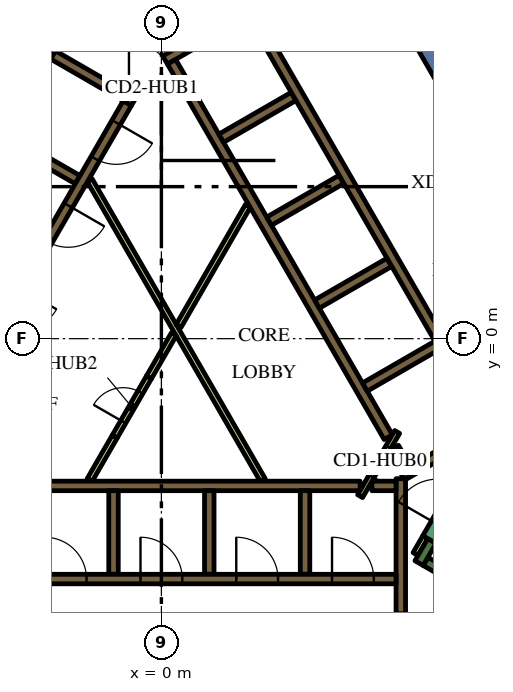
"""IFC4 building model, lengths in metres.
Left out: names, types, materials, properties, quantities, classifications, styles, units other than length and angle.
Written with IfcOpenShell. Run it as: python <this file> out.ifc"""

import sys

from ifc_helpers import new_model, si_unit, direction, frame, frame_2d, origin, place, context, subcontext, project, spatial, polyline, rectangle, outline, extrude, element, fill, save


model = new_model("IFC4")
c1 = context("Model", 3, precision=1e-05, world=origin(), true_north=direction((0.0, 1.0)))
c2 = subcontext(c1, "Body", "Model", "MODEL_VIEW")
j1 = project(units=[si_unit("LENGTHUNIT", "METRE"), si_unit("PLANEANGLEUNIT", "RADIAN")], contexts=[c1])
p1 = place(None, origin())
s1 = spatial("IfcSite", under=j1, at=p1, CompositionType="ELEMENT")
p2 = place(p1, origin())
s2 = spatial("IfcBuilding", under=s1, at=p2, CompositionType="ELEMENT")
p3 = place(p2, frame((0.0, 0.0, 201.6)))
s3 = spatial("IfcBuildingStorey", under=s2, at=p3, CompositionType="ELEMENT", Elevation=201.6)
p4 = place(p3, frame((8.235, 5.736, 0.0), z_axis=(0.0, 0.0, 1.0), x_axis=(-0.499983401189, 0.8660349869, 0.0)))
e1 = element("IfcWall", 1, at=p4, inside=s3, PredefinedType="SOLIDWALL", context=c2, shape_type="SweptSolid", body=[
    extrude(rectangle(XDim=12.472, YDim=0.7, at=frame_2d((6.236, 0.0))), origin(), (0.0, 0.0, 1.0), 4.2),
])
p5 = place(p3, frame((12.84, -9.261, 0.0), z_axis=(0.0, 0.0, 1.0), x_axis=(-0.866013990052, 0.500019768644, 0.0)))
e2 = element("IfcWall", 2, at=p5, inside=s3, PredefinedType="SOLIDWALL", context=c2, shape_type="SweptSolid", body=[
    extrude(rectangle(XDim=6.8, YDim=0.25, at=frame_2d((3.4, 0.0))), origin(), (0.0, 0.0, 1.0), 4.2),
])
p6 = place(p3, frame((6.78, -5.906, 0.0), z_axis=(0.0, 0.0, 1.0), x_axis=(0.500223362819, 0.865896406789, 0.0)))
e3 = element("IfcWall", 3, at=p6, inside=s3, PredefinedType="SOLIDWALL", context=c2, shape_type="SweptSolid", body=[
    extrude(rectangle(XDim=0.675, YDim=0.25, at=frame_2d((0.337, 0.0))), origin(), (0.0, 0.0, 1.0), 4.2),
])
p7 = place(p3, frame((-5.259, -3.875, 0.0), z_axis=(0.0, 0.0, 1.0), x_axis=(1.0, 0.0, 0.0)))
e4 = element("IfcWall", 4, at=p7, inside=s3, PredefinedType="SOLIDWALL", context=c2, shape_type="SweptSolid", body=[
    extrude(rectangle(XDim=10.489, YDim=0.25, at=frame_2d((5.244, 0.0))), origin(), (0.0, 0.0, 1.0), 4.2),
])
for number, where, z_axis, x_axis in (
    (5, (3.78, -4.0, 0.0), (0.0, 0.0, 1.0), (0.0, -1.0, 0.0)),
    (6, (1.26, -4.0, 0.0), (0.0, 0.0, 1.0), (0.0, -1.0, 0.0)),
    (7, (-1.26, -4.0, 0.0), (0.0, 0.0, 1.0), (0.0, -1.0, 0.0)),
):
    element("IfcWall", number, at=place(p3, frame(where, z_axis=z_axis, x_axis=x_axis)), inside=s3, PredefinedType="SOLIDWALL", context=c2, shape_type="SweptSolid", body=[
        extrude(rectangle(XDim=2.2, YDim=0.25, at=frame_2d((1.1, 0.0))), origin(), (0.0, 0.0, 1.0), 4.2),
    ])
p8 = place(p3, frame((6.3, -7.24, 0.0), z_axis=(0.0, 0.0, 1.0), x_axis=(0.0, 1.0, 0.0)))
e8 = element("IfcWall", 8, at=p8, inside=s3, PredefinedType="SOLIDWALL", context=c2, shape_type="SweptSolid", body=[
    extrude(rectangle(XDim=3.556, YDim=0.25, at=frame_2d((1.778, 0.0))), origin(), (0.0, 0.0, 1.0), 4.2),
])
p9 = place(p3, frame((5.538, -3.875, 0.0), z_axis=(0.0, 0.0, 1.0), x_axis=(1.0, 0.0, 0.0)))
e9 = element("IfcWall", 9, at=p9, inside=s3, PredefinedType="SOLIDWALL", context=c2, shape_type="SweptSolid", body=[
    extrude(rectangle(XDim=0.637, YDim=0.25, at=frame_2d((0.318, 0.0))), origin(), (0.0, 0.0, 1.0), 4.2),
])
p10 = place(p3, frame((9.19, -1.969, 0.0), z_axis=(0.0, 0.0, 1.0), x_axis=(-0.866057109641, -0.499945079824, 0.0)))
e10 = element("IfcWall", 10, at=p10, inside=s3, PredefinedType="SOLIDWALL", context=c2, shape_type="SweptSolid", body=[
    extrude(rectangle(XDim=3.291, YDim=0.25, at=frame_2d((1.646, 0.0))), origin(), (0.0, 0.0, 1.0), 4.2),
])
p11 = place(p3, frame((6.13, -2.867, 0.0), z_axis=(0.0, 0.0, 1.0), x_axis=(0.500160776593, -0.865932559475, 0.0)))
e11 = element("IfcWall", 11, at=p11, inside=s3, PredefinedType="SOLIDWALL", context=c2, shape_type="SweptSolid", body=[
    extrude(rectangle(XDim=0.627, YDim=0.25, at=frame_2d((0.313, 0.0))), origin(), (0.0, 0.0, 1.0), 4.2),
])
p12 = place(p3, frame((3.1, 9.064, 0.0), z_axis=(0.0, 0.0, 1.0), x_axis=(-0.866033137035, -0.499986605379, 0.0)))
e12 = element("IfcWall", 12, at=p12, inside=s3, PredefinedType="SOLIDWALL", context=c2, shape_type="SweptSolid", body=[
    extrude(rectangle(XDim=3.467, YDim=0.25, at=frame_2d((1.733, 0.0))), origin(), (0.0, 0.0, 1.0), 4.2),
])
p13 = place(p3, frame((0.268, 7.285, 0.0), z_axis=(0.0, 0.0, 1.0), x_axis=(0.500098681536, -0.865968422476, 0.0)))
e13 = element("IfcWall", 13, at=p13, inside=s3, PredefinedType="SOLIDWALL", context=c2, shape_type="SweptSolid", body=[
    extrude(rectangle(XDim=0.636, YDim=0.25, at=frame_2d((0.318, 0.0))), origin(), (0.0, 0.0, 1.0), 4.2),
])
p14 = place(p3, frame((5.97, -2.591, 0.0), z_axis=(0.0, 0.0, 1.0), x_axis=(-0.499994469932, 0.866028596547, 0.0)))
e14 = element("IfcWall", 14, at=p14, inside=s3, PredefinedType="SOLIDWALL", context=c2, shape_type="SweptSolid", body=[
    extrude(rectangle(XDim=10.488, YDim=0.25, at=frame_2d((5.244, 0.0))), origin(), (0.0, 0.0, 1.0), 4.2),
])
p15 = place(p3, frame((1.574, 5.274, 0.0), z_axis=(0.0, 0.0, 1.0), x_axis=(0.866028486751, 0.499994660107, 0.0)))
e15 = element("IfcWall", 15, at=p15, inside=s3, PredefinedType="SOLIDWALL", context=c2, shape_type="SweptSolid", body=[
    extrude(rectangle(XDim=2.2, YDim=0.25, at=frame_2d((1.1, 0.0))), origin(), (0.0, 0.0, 1.0), 4.2),
])
for number, where, z_axis, x_axis in (
    (16, (2.834, 3.091, 0.0), (0.0, 0.0, 1.0), (0.866, 0.5, 0.0)),
    (17, (4.094, 0.909, 0.0), (0.0, 0.0, 1.0), (0.866, 0.5, 0.0)),
    (18, (5.354, -1.274, 0.0), (0.0, 0.0, 1.0), (0.866, 0.5, 0.0)),
):
    element("IfcWall", number, at=place(p3, frame(where, z_axis=z_axis, x_axis=x_axis)), inside=s3, PredefinedType="SOLIDWALL", context=c2, shape_type="SweptSolid", body=[
        extrude(rectangle(XDim=2.2, YDim=0.25, at=frame_2d((1.1, 0.0))), origin(), (0.0, 0.0, 1.0), 4.2),
    ])
p16 = place(p3, origin())
e19 = element("IfcWall", 19, at=p16, inside=s3, PredefinedType="SOLIDWALL", context=c2, shape_type="SweptSolid", body=[
    extrude(outline(polyline([(-2.912, 7.356), (-2.787, 7.573), (-1.232, 6.675), (-1.303, 6.675), (-1.304, 6.675), (-1.304, 6.675), (-1.304, 6.525), (-1.304, 6.525), (-1.303, 6.525), (-0.971, 6.525), (-0.665, 6.348), (-0.79, 6.132), (-1.007, 6.257), (-1.007, 6.257), (-2.912, 7.356)])), origin(), (0.0, 0.0, 1.0), 4.2),
])
p17 = place(p3, frame((-2.204, 4.182, 0.0), z_axis=(0.0, 0.0, 1.0), x_axis=(-0.866008176907, 0.50002983664, 0.0)))
e20 = element("IfcWall", 20, at=p17, inside=s3, PredefinedType="SOLIDWALL", context=c2, shape_type="SweptSolid", body=[
    extrude(rectangle(XDim=2.2, YDim=0.25, at=frame_2d((1.1, 0.0))), origin(), (0.0, 0.0, 1.0), 4.2),
])
p18 = place(p3, frame((6.945, -5.222, 0.0), z_axis=(0.0, 0.0, 1.0), x_axis=(-0.499818422106, -0.866130212453, 0.0)))
e21 = element("IfcWall", 21, at=p18, inside=s3, PredefinedType="PARTITIONING", context=c2, shape_type="SweptSolid", body=[
    extrude(rectangle(XDim=0.514, YDim=0.15, at=frame_2d((0.257, 0.0))), origin(), (0.0, 0.0, 1.0), 3.45),
])
p19 = place(p3, frame((-1.887, 4.168, 0.0), z_axis=(0.0, 0.0, 1.0), x_axis=(0.499997069472, -0.866027095719, 0.0)))
e22 = element("IfcWall", 22, at=p19, inside=s3, PredefinedType="PARTITIONING", context=c2, shape_type="SweptSolid", body=[
    extrude(rectangle(XDim=9.106, YDim=0.15, at=frame_2d((4.553, 0.0))), origin(), (0.0, 0.0, 1.0), 3.45),
])
p20 = place(p3, frame((-0.329, -1.021, 0.0), z_axis=(0.0, 0.0, 1.0), x_axis=(0.500033191285, 0.866006239939, 0.0)))
e23 = element("IfcWall", 23, at=p20, inside=s3, PredefinedType="PARTITIONING", context=c2, shape_type="SweptSolid", body=[
    extrude(rectangle(XDim=1.315, YDim=0.15, at=frame_2d((0.657, 0.0))), origin(), (0.0, 0.0, 1.0), 3.45),
])
p21 = place(p3, frame((2.277, 3.493, 0.0), z_axis=(0.0, 0.0, 1.0), x_axis=(-0.499994550825, -0.866028549844, 0.0)))
e24 = element("IfcWall", 24, at=p21, inside=s3, PredefinedType="PARTITIONING", context=c2, shape_type="SweptSolid", body=[
    extrude(rectangle(XDim=3.65, YDim=0.15, at=frame_2d((1.825, 0.0))), origin(), (0.0, 0.0, 1.0), 3.45),
])
p22 = place(p3, frame((-1.887, -3.718, 0.0), z_axis=(0.0, 0.0, 1.0), x_axis=(0.500033191285, 0.866006239939, 0.0)))
e25 = element("IfcWall", 25, at=p22, inside=s3, PredefinedType="PARTITIONING", context=c2, shape_type="SweptSolid", body=[
    extrude(rectangle(XDim=1.315, YDim=0.15, at=frame_2d((0.657, 0.0))), origin(), (0.0, 0.0, 1.0), 3.45),
])
p23 = place(p3, frame((-6.175, -6.325, 0.0), z_axis=(0.0, 0.0, 1.0), x_axis=(1.0, 0.0, 0.0)))
e26 = element("IfcWall", 26, at=p23, inside=s3, PredefinedType="SOLIDWALL", context=c2, shape_type="SweptSolid", body=[
    extrude(rectangle(XDim=12.35, YDim=0.25, at=frame_2d((6.175, 0.0))), origin(), (0.0, 0.0, 1.0), 4.2),
])
p24 = place(p23, frame((0.585, 0.0, 0.0)))
e27 = element("IfcOpeningElement", 27, at=p24, cuts=e26, PredefinedType="OPENING", context=c2, shape_type="SweptSolid", body=[
    extrude(rectangle(XDim=1.1, YDim=2.1, at=frame_2d((0.55, 1.05))), frame((0.0, 0.135, 0.0), z_axis=(0.0, -1.0, 0.0), x_axis=(1.0, 0.0, 0.0)), (0.0, 0.0, 1.0), 0.27),
])
p25 = place(p23, frame((3.105, 0.0, 0.0)))
e28 = element("IfcOpeningElement", 28, at=p25, cuts=e26, PredefinedType="OPENING", context=c2, shape_type="SweptSolid", body=[
    extrude(rectangle(XDim=1.1, YDim=2.1, at=frame_2d((0.55, 1.05))), frame((0.0, 0.135, 0.0), z_axis=(0.0, -1.0, 0.0), x_axis=(1.0, 0.0, 0.0)), (0.0, 0.0, 1.0), 0.27),
])
p26 = place(p23, frame((5.625, 0.0, 0.0)))
e29 = element("IfcOpeningElement", 29, at=p26, cuts=e26, PredefinedType="OPENING", context=c2, shape_type="SweptSolid", body=[
    extrude(rectangle(XDim=1.1, YDim=2.1, at=frame_2d((0.55, 1.05))), frame((0.0, 0.135, 0.0), z_axis=(0.0, -1.0, 0.0), x_axis=(1.0, 0.0, 0.0)), (0.0, 0.0, 1.0), 0.27),
])
p27 = place(p23, frame((8.145, 0.0, 0.0)))
e30 = element("IfcOpeningElement", 30, at=p27, cuts=e26, PredefinedType="OPENING", context=c2, shape_type="SweptSolid", body=[
    extrude(rectangle(XDim=1.1, YDim=2.1, at=frame_2d((0.55, 1.05))), frame((0.0, 0.135, 0.0), z_axis=(0.0, -1.0, 0.0), x_axis=(1.0, 0.0, 0.0)), (0.0, 0.0, 1.0), 0.27),
])
p28 = place(p23, frame((10.665, 0.0, 0.0)))
e31 = element("IfcOpeningElement", 31, at=p28, cuts=e26, PredefinedType="OPENING", context=c2, shape_type="SweptSolid", body=[
    extrude(rectangle(XDim=1.1, YDim=2.1, at=frame_2d((0.55, 1.05))), frame((0.0, 0.135, 0.0), z_axis=(0.0, -1.0, 0.0), x_axis=(1.0, 0.0, 0.0)), (0.0, 0.0, 1.0), 0.27),
])
p29 = place(p3, frame((8.565, -2.185, 0.0), z_axis=(0.0, 0.0, 1.0), x_axis=(-0.499997954832, 0.866026584559, 0.0)))
e32 = element("IfcWall", 32, at=p29, inside=s3, PredefinedType="SOLIDWALL", context=c2, shape_type="SweptSolid", body=[
    extrude(rectangle(XDim=12.35, YDim=0.25, at=frame_2d((6.175, 0.0))), origin(), (0.0, 0.0, 1.0), 4.2),
])
p30 = place(p29, frame((0.585, 0.0, 0.0)))
e33 = element("IfcOpeningElement", 33, at=p30, cuts=e32, PredefinedType="OPENING", context=c2, shape_type="SweptSolid", body=[
    extrude(rectangle(XDim=1.1, YDim=2.1, at=frame_2d((0.55, 1.05))), frame((0.0, 0.135, 0.0), z_axis=(0.0, -1.0, 0.0), x_axis=(1.0, 0.0, 0.0)), (0.0, 0.0, 1.0), 0.27),
])
p31 = place(p3, frame((-0.898, 6.194, 0.0), z_axis=(0.0, 0.0, 1.0), x_axis=(-0.499996202215, -0.866027596426, 0.0)))
e34 = element("IfcWall", 34, at=p31, inside=s3, PredefinedType="SOLIDWALL", context=c2, shape_type="SweptSolid", body=[
    extrude(rectangle(XDim=9.83, YDim=0.25, at=frame_2d((4.915, 0.0))), origin(), (0.0, 0.0, 1.0), 4.2),
])
p32 = place(p31, frame((0.585, 0.0, 0.0)))
e35 = element("IfcOpeningElement", 35, at=p32, cuts=e34, PredefinedType="OPENING", context=c2, shape_type="SweptSolid", body=[
    extrude(rectangle(XDim=1.1, YDim=2.1, at=frame_2d((0.55, 1.05))), frame((0.0, 0.135, 0.0), z_axis=(0.0, -1.0, 0.0), x_axis=(1.0, 0.0, 0.0)), (0.0, 0.0, 1.0), 0.27),
])
p33 = place(p31, frame((3.105, 0.0, 0.0)))
e36 = element("IfcOpeningElement", 36, at=p33, cuts=e34, PredefinedType="OPENING", context=c2, shape_type="SweptSolid", body=[
    extrude(rectangle(XDim=1.1, YDim=2.1, at=frame_2d((0.55, 1.05))), frame((0.0, 0.135, 0.0), z_axis=(0.0, -1.0, 0.0), x_axis=(1.0, 0.0, 0.0)), (0.0, 0.0, 1.0), 0.27),
])
p34 = place(p31, frame((5.625, 0.0, 0.0)))
e37 = element("IfcOpeningElement", 37, at=p34, cuts=e34, PredefinedType="OPENING", context=c2, shape_type="SweptSolid", body=[
    extrude(rectangle(XDim=1.1, YDim=2.1, at=frame_2d((0.55, 1.05))), frame((0.0, 0.135, 0.0), z_axis=(0.0, -1.0, 0.0), x_axis=(1.0, 0.0, 0.0)), (0.0, 0.0, 1.0), 0.27),
])
p35 = place(p31, frame((8.145, 0.0, 0.0)))
e38 = element("IfcOpeningElement", 38, at=p35, cuts=e34, PredefinedType="OPENING", context=c2, shape_type="SweptSolid", body=[
    extrude(rectangle(XDim=1.1, YDim=2.1, at=frame_2d((0.55, 1.05))), frame((0.0, 0.135, 0.0), z_axis=(0.0, -1.0, 0.0), x_axis=(1.0, 0.0, 0.0)), (0.0, 0.0, 1.0), 0.27),
])
p36 = place(p3, frame((7.053, -5.284, 0.0), z_axis=(0.0, 0.0, 1.0), x_axis=(0.500078061341, 0.865980330357, 0.0)))
e39 = element("IfcWall", 39, at=p36, inside=s3, PredefinedType="SOLIDWALL", context=c2, shape_type="SweptSolid", body=[
    extrude(rectangle(XDim=2.1, YDim=0.4, at=frame_2d((1.05, 0.0))), origin(), (0.0, 0.0, 1.0), 4.2),
])
p37 = place(p36, frame((0.45, 0.0, 0.0)))
e40 = element("IfcOpeningElement", 40, at=p37, cuts=e39, PredefinedType="OPENING", context=c2, shape_type="SweptSolid", body=[
    extrude(rectangle(XDim=1.2, YDim=2.1, at=frame_2d((0.6, 1.05))), frame((0.0, 0.21, 0.0), z_axis=(0.0, -1.0, 0.0), x_axis=(1.0, 0.0, 0.0)), (0.0, 0.0, 1.0), 0.42),
])
p38 = place(p3, frame((6.203, -2.456, 0.0), z_axis=(0.0, 0.0, 1.0), x_axis=(-0.500043961785, -0.866000020948, 0.0)))
e41 = element("IfcWall", 41, at=p38, inside=s3, PredefinedType="PARTITIONING", context=c2, shape_type="SweptSolid", body=[
    extrude(rectangle(XDim=1.95, YDim=0.15, at=frame_2d((0.975, 0.0))), origin(), (0.0, 0.0, 1.0), 4.2),
])
p39 = place(p38, frame((0.45, 0.0, 0.0)))
e42 = element("IfcOpeningElement", 42, at=p39, cuts=e41, PredefinedType="OPENING", context=c2, shape_type="SweptSolid", body=[
    extrude(rectangle(XDim=0.9, YDim=2.1, at=frame_2d((0.45, 1.05))), frame((0.0, 0.085, 0.0), z_axis=(0.0, -1.0, 0.0), x_axis=(1.0, 0.0, 0.0)), (0.0, 0.0, 1.0), 0.17),
])
p40 = place(p3, frame((-1.303, 6.6, 0.0), z_axis=(0.0, 0.0, 1.0), x_axis=(1.0, 0.0, 0.0)))
e43 = element("IfcWall", 43, at=p40, inside=s3, PredefinedType="PARTITIONING", context=c2, shape_type="SweptSolid", body=[
    extrude(rectangle(XDim=2.1, YDim=0.15, at=frame_2d((1.05, 0.0))), origin(), (0.0, 0.0, 1.0), 4.2),
])
p41 = place(p40, frame((0.45, 0.0, 0.0)))
e44 = element("IfcOpeningElement", 44, at=p41, cuts=e43, PredefinedType="OPENING", context=c2, shape_type="SweptSolid", body=[
    extrude(rectangle(XDim=1.2, YDim=2.1, at=frame_2d((0.6, 1.05))), frame((0.0, 0.085, 0.0), z_axis=(0.0, -1.0, 0.0), x_axis=(1.0, 0.0, 0.0)), (0.0, 0.0, 1.0), 0.17),
])
p42 = place(p3, frame((-1.229, -2.579, 0.0), z_axis=(0.0, 0.0, 1.0), x_axis=(0.500062916607, 0.865989075817, 0.0)))
e45 = element("IfcWall", 45, at=p42, inside=s3, PredefinedType="PARTITIONING", context=c2, shape_type="SweptSolid", body=[
    extrude(rectangle(XDim=1.8, YDim=0.15, at=frame_2d((0.9, 0.0))), origin(), (0.0, 0.0, 1.0), 3.45),
])
p43 = place(p42, frame((0.45, 0.0, 0.0)))
e46 = element("IfcOpeningElement", 46, at=p43, cuts=e45, PredefinedType="OPENING", context=c2, shape_type="SweptSolid", body=[
    extrude(rectangle(XDim=0.9, YDim=2.1, at=frame_2d((0.45, 1.05))), frame((0.0, 0.085, 0.0), z_axis=(0.0, -1.0, 0.0), x_axis=(1.0, 0.0, 0.0)), (0.0, 0.0, 1.0), 0.17),
])
p44 = place(p25, origin())
e47 = element("IfcDoor", 47, at=p44, inside=s3, OperationType="DOUBLE_DOOR_SLIDING", PredefinedType="DOOR", context=c2, shape_type="SweptSolid", body=[
    extrude(rectangle(XDim=1.1, YDim=2.1, at=frame_2d((0.55, 1.05))), frame((0.0, 0.025, 0.0), z_axis=(0.0, -1.0, 0.0), x_axis=(1.0, 0.0, 0.0)), (0.0, 0.0, 1.0), 0.05),
])
fill(e28, e47)
p45 = place(p26, origin())
e48 = element("IfcDoor", 48, at=p45, inside=s3, OperationType="DOUBLE_DOOR_SLIDING", PredefinedType="DOOR", context=c2, shape_type="SweptSolid", body=[
    extrude(rectangle(XDim=1.1, YDim=2.1, at=frame_2d((0.55, 1.05))), frame((0.0, 0.025, 0.0), z_axis=(0.0, -1.0, 0.0), x_axis=(1.0, 0.0, 0.0)), (0.0, 0.0, 1.0), 0.05),
])
fill(e29, e48)
p46 = place(p27, origin())
e49 = element("IfcDoor", 49, at=p46, inside=s3, OperationType="DOUBLE_DOOR_SLIDING", PredefinedType="DOOR", context=c2, shape_type="SweptSolid", body=[
    extrude(rectangle(XDim=1.1, YDim=2.1, at=frame_2d((0.55, 1.05))), frame((0.0, 0.025, 0.0), z_axis=(0.0, -1.0, 0.0), x_axis=(1.0, 0.0, 0.0)), (0.0, 0.0, 1.0), 0.05),
])
fill(e30, e49)
p47 = place(p28, origin())
e50 = element("IfcDoor", 50, at=p47, inside=s3, OperationType="DOUBLE_DOOR_SLIDING", PredefinedType="DOOR", context=c2, shape_type="SweptSolid", body=[
    extrude(rectangle(XDim=1.1, YDim=2.1, at=frame_2d((0.55, 1.05))), frame((0.0, 0.025, 0.0), z_axis=(0.0, -1.0, 0.0), x_axis=(1.0, 0.0, 0.0)), (0.0, 0.0, 1.0), 0.05),
])
fill(e31, e50)
p48 = place(p32, origin())
e51 = element("IfcDoor", 51, at=p48, inside=s3, OperationType="DOUBLE_DOOR_SLIDING", PredefinedType="DOOR", context=c2, shape_type="SweptSolid", body=[
    extrude(rectangle(XDim=1.1, YDim=2.1, at=frame_2d((0.55, 1.05))), frame((0.0, 0.025, 0.0), z_axis=(0.0, -1.0, 0.0), x_axis=(1.0, 0.0, 0.0)), (0.0, 0.0, 1.0), 0.05),
])
fill(e35, e51)
p49 = place(p33, origin())
e52 = element("IfcDoor", 52, at=p49, inside=s3, OperationType="DOUBLE_DOOR_SLIDING", PredefinedType="DOOR", context=c2, shape_type="SweptSolid", body=[
    extrude(rectangle(XDim=1.1, YDim=2.1, at=frame_2d((0.55, 1.05))), frame((0.0, 0.025, 0.0), z_axis=(0.0, -1.0, 0.0), x_axis=(1.0, 0.0, 0.0)), (0.0, 0.0, 1.0), 0.05),
])
fill(e36, e52)
p50 = place(p39, origin())
e53 = element("IfcDoor", 53, at=p50, inside=s3, OperationType="SINGLE_SWING_LEFT", PredefinedType="DOOR", context=c2, shape_type="SweptSolid", body=[
    extrude(rectangle(XDim=0.9, YDim=2.1, at=frame_2d((0.45, 1.05))), frame((0.0, 0.025, 0.0), z_axis=(0.0, -1.0, 0.0), x_axis=(1.0, 0.0, 0.0)), (0.0, 0.0, 1.0), 0.05),
])
fill(e42, e53)
p51 = place(p41, origin())
e54 = element("IfcDoor", 54, at=p51, inside=s3, OperationType="SINGLE_SWING_LEFT", PredefinedType="DOOR", context=c2, shape_type="SweptSolid", body=[
    extrude(rectangle(XDim=1.2, YDim=2.1, at=frame_2d((0.6, 1.05))), frame((0.0, 0.025, 0.0), z_axis=(0.0, -1.0, 0.0), x_axis=(1.0, 0.0, 0.0)), (0.0, 0.0, 1.0), 0.05),
])
fill(e44, e54)
p52 = place(p43, origin())
e55 = element("IfcDoor", 55, at=p52, inside=s3, OperationType="SINGLE_SWING_LEFT", PredefinedType="DOOR", context=c2, shape_type="SweptSolid", body=[
    extrude(rectangle(XDim=0.9, YDim=2.1, at=frame_2d((0.45, 1.05))), frame((0.0, 0.025, 0.0), z_axis=(0.0, -1.0, 0.0), x_axis=(1.0, 0.0, 0.0)), (0.0, 0.0, 1.0), 0.05),
])
fill(e46, e55)
save(model, sys.argv[1])
